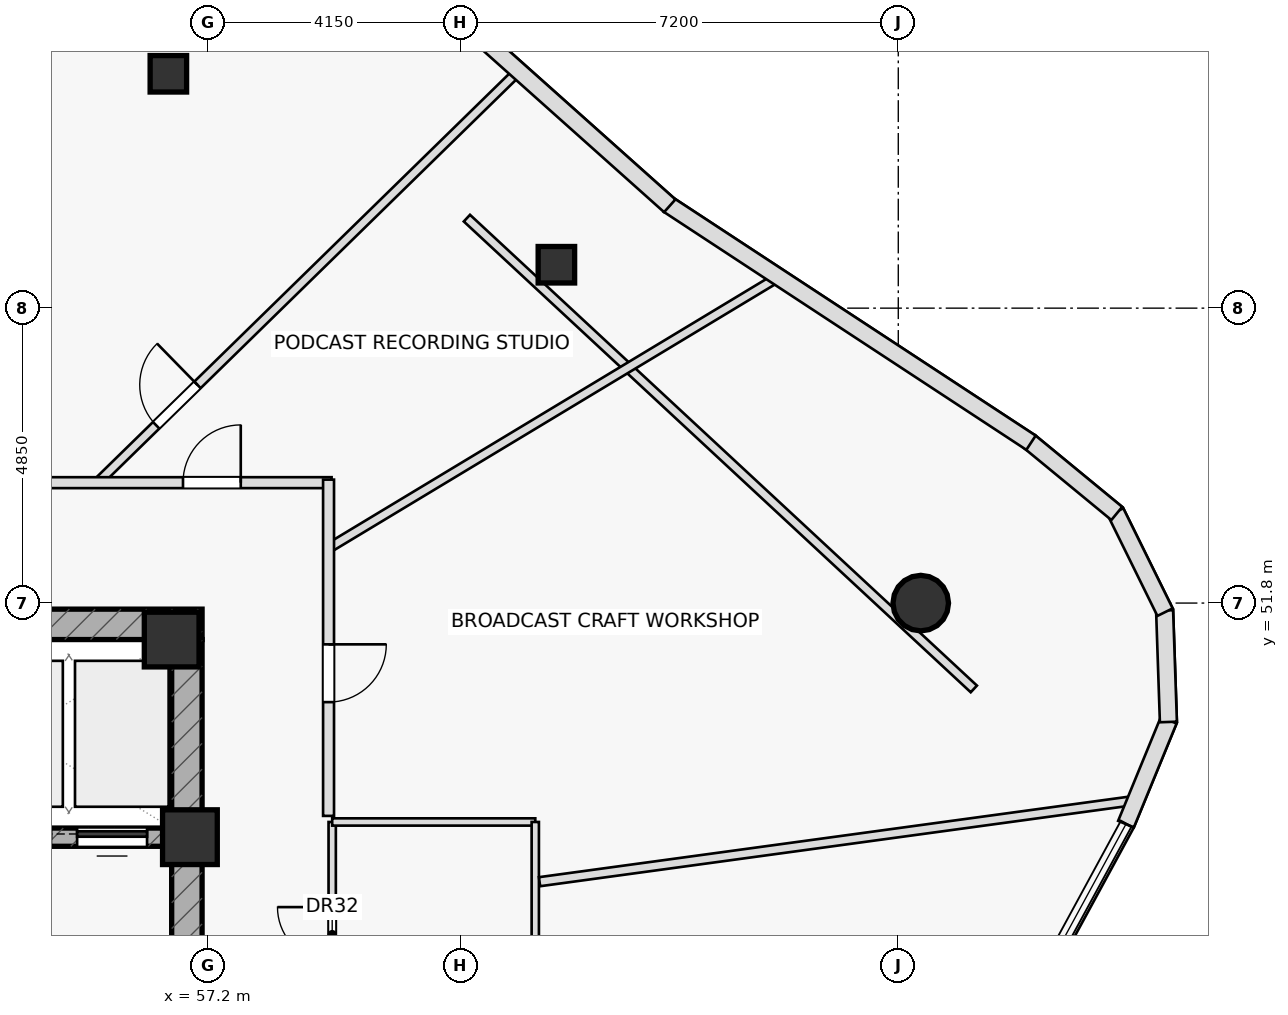
"""IFC4 building model, lengths in metres.
Left out: names, types, materials, properties, quantities, classifications, styles, units other than length and angle.
Written with IfcOpenShell. Run it as: python <this file> out.ifc"""

import sys

from ifc_helpers import new_model, si_unit, direction, frame, frame_2d, origin, origin_2d, place, context, subcontext, project, spatial, rectangle, hollow_rectangle, hollow_circle, extrude, element, fill, save


model = new_model("IFC4")
c1 = context("Model", 3, precision=1e-05, world=origin(), true_north=direction((0.0, 1.0)))
c2 = subcontext(c1, "Body", "Model", "MODEL_VIEW")
j1 = project(units=[si_unit("LENGTHUNIT", "METRE"), si_unit("PLANEANGLEUNIT", "RADIAN")], contexts=[c1])
p1 = place(None, origin())
s1 = spatial("IfcSite", under=j1, at=p1, CompositionType="ELEMENT")
p2 = place(p1, origin())
s2 = spatial("IfcBuilding", under=s1, at=p2, CompositionType="ELEMENT")
p3 = place(p2, frame((0.0, 0.0, 226.1)))
s3 = spatial("IfcBuildingStorey", under=s2, at=p3, CompositionType="ELEMENT", Elevation=226.1)
p4 = place(p3, frame((42.9, 51.45, 0.0), z_axis=(0.0, 0.0, 1.0), x_axis=(1.0, 0.0, 0.0)))
e1 = element("IfcWall", 1, at=p4, inside=s3, PredefinedType="SHEAR", context=c2, shape_type="SweptSolid", body=[
    extrude(rectangle(XDim=14.2, YDim=0.5, at=frame_2d((7.1, 0.0))), origin(), (0.0, 0.0, 1.0), 3.65),
])
p5 = place(p4, frame((0.78, 0.0, 0.0)))
e2 = element("IfcOpeningElement", 2, at=p5, cuts=e1, PredefinedType="OPENING", context=c2, shape_type="SweptSolid", body=[
    extrude(rectangle(XDim=1.05, YDim=2.2, at=frame_2d((0.525, 1.1))), frame((0.0, 0.26, 0.0), z_axis=(0.0, -1.0, 0.0), x_axis=(1.0, 0.0, 0.0)), (0.0, 0.0, 1.0), 0.52),
])
p6 = place(p3, frame((56.85, 38.8, 0.0), z_axis=(0.0, 0.0, 1.0), x_axis=(0.0, 1.0, 0.0)))
e3 = element("IfcWall", 3, at=p6, inside=s3, PredefinedType="SHEAR", context=c2, shape_type="SweptSolid", body=[
    extrude(rectangle(XDim=12.4, YDim=0.5, at=frame_2d((6.2, 0.0))), origin(), (0.0, 0.0, 1.0), 3.65),
])
p7 = place(p6, frame((3.85, 0.0, 0.0)))
e4 = element("IfcOpeningElement", 4, at=p7, cuts=e3, PredefinedType="OPENING", context=c2, shape_type="SweptSolid", body=[
    extrude(rectangle(XDim=1.5, YDim=2.2, at=frame_2d((0.75, 1.1))), frame((0.0, 0.26, 0.0), z_axis=(0.0, -1.0, 0.0), x_axis=(1.0, 0.0, 0.0)), (0.0, 0.0, 1.0), 0.52),
])
p8 = place(p3, frame((43.4, 47.95, 0.0), z_axis=(0.0, 0.0, 1.0), x_axis=(1.0, 0.0, 0.0)))
e5 = element("IfcWall", 5, at=p8, inside=s3, PredefinedType="SHEAR", context=c2, shape_type="SweptSolid", body=[
    extrude(rectangle(XDim=13.2, YDim=0.3, at=frame_2d((6.6, 0.0))), origin(), (0.0, 0.0, 1.0), 3.65),
])
p9 = place(p8, frame((8.345, 0.0, 0.0)))
e6 = element("IfcOpeningElement", 6, at=p9, cuts=e5, PredefinedType="OPENING", context=c2, shape_type="SweptSolid", body=[
    extrude(rectangle(XDim=1.15, YDim=2.2, at=frame_2d((0.575, 1.1))), frame((0.0, 0.16, 0.0), z_axis=(0.0, -1.0, 0.0), x_axis=(1.0, 0.0, 0.0)), (0.0, 0.0, 1.0), 0.32),
])
p10 = place(p8, frame((10.065, 0.0, 0.0)))
e7 = element("IfcOpeningElement", 7, at=p10, cuts=e5, PredefinedType="OPENING", context=c2, shape_type="SweptSolid", body=[
    extrude(rectangle(XDim=1.15, YDim=2.2, at=frame_2d((0.575, 1.1))), frame((0.0, 0.16, 0.0), z_axis=(0.0, -1.0, 0.0), x_axis=(1.0, 0.0, 0.0)), (0.0, 0.0, 1.0), 0.32),
])
p11 = place(p8, frame((11.645, 0.0, 0.0)))
e8 = element("IfcOpeningElement", 8, at=p11, cuts=e5, PredefinedType="OPENING", context=c2, shape_type="SweptSolid", body=[
    extrude(rectangle(XDim=1.15, YDim=2.2, at=frame_2d((0.575, 1.1))), frame((0.0, 0.16, 0.0), z_axis=(0.0, -1.0, 0.0), x_axis=(1.0, 0.0, 0.0)), (0.0, 0.0, 1.0), 0.32),
])
for number, where, z_axis, x_axis in (
    (9, (56.9, 47.95, 0.0), (0.0, 0.0, 1.0), (1.0, 0.0, 0.0)),
    (10, (56.6, 51.2, 0.0), (0.0, 0.0, 1.0), (1.0, 0.0, 0.0)),
):
    element("IfcColumn", number, at=place(p3, frame(where, z_axis=z_axis, x_axis=x_axis)), inside=s3, PredefinedType="COLUMN", context=c2, shape_type="SweptSolid", body=[
        extrude(rectangle(XDim=0.9, YDim=0.9, at=origin_2d()), origin(), (0.0, 0.0, 1.0), 3.65),
    ])
p12 = place(p3, frame((68.92, 51.799, 0.0), z_axis=(0.0, 0.0, 1.0), x_axis=(1.0, 0.0, 0.0)))
e11 = element("IfcColumn", 11, at=p12, inside=s3, PredefinedType="COLUMN", context=c2, shape_type="SweptSolid", body=[
    extrude(hollow_circle(Radius=0.457, WallThickness=0.04, at=origin_2d()), origin(), (0.0, 0.0, 1.0), 3.65),
])
for number, where, z_axis, x_axis in (
    (12, (62.927, 57.364, 0.0), (0.0, 0.0, 1.0), (1.0, 0.0, 0.0)),
    (13, (56.546, 60.504, 0.0), (0.0, 0.0, 1.0), (1.0, 0.0, 0.0)),
):
    element("IfcColumn", number, at=place(p3, frame(where, z_axis=z_axis, x_axis=x_axis)), inside=s3, PredefinedType="COLUMN", context=c2, shape_type="SweptSolid", body=[
        extrude(hollow_rectangle(XDim=0.6, YDim=0.6, WallThickness=0.036, at=origin_2d()), origin(), (0.0, 0.0, 1.0), 3.65),
    ])
p13 = place(p3, frame((69.792, 50.388, 0.0), z_axis=(0.0, 0.0, 1.0), x_axis=(-0.732769799181, 0.680476613418, 0.0)))
e14 = element("IfcWall", 14, at=p13, inside=s3, PredefinedType="PARTITIONING", context=c2, shape_type="SweptSolid", body=[
    extrude(rectangle(XDim=11.378, YDim=0.15, at=frame_2d((5.689, 0.0))), origin(), (0.0, 0.0, 1.0), 3.025),
])
p14 = place(p3, frame((59.24, 41.2, 0.0), z_axis=(0.0, 0.0, 1.0), x_axis=(0.0, 1.0, 0.0)))
e15 = element("IfcWall", 15, at=p14, inside=s3, PredefinedType="PARTITIONING", context=c2, shape_type="SweptSolid", body=[
    extrude(rectangle(XDim=7.0, YDim=0.12, at=frame_2d((3.5, 0.0))), origin(), (0.0, 0.0, 1.0), 3.65),
])
p15 = place(p14, frame((1.15, 0.0, 0.0)))
e16 = element("IfcOpeningElement", 16, at=p15, cuts=e15, PredefinedType="OPENING", context=c2, shape_type="SweptSolid", body=[
    extrude(rectangle(XDim=0.9, YDim=2.05, at=frame_2d((0.45, 1.025))), frame((0.0, 0.07, 0.0), z_axis=(0.0, -1.0, 0.0), x_axis=(1.0, 0.0, 0.0)), (0.0, 0.0, 1.0), 0.14),
])
p16 = place(p14, frame((4.7, 0.0, 0.0)))
e17 = element("IfcOpeningElement", 17, at=p16, cuts=e15, PredefinedType="OPENING", context=c2, shape_type="SweptSolid", body=[
    extrude(rectangle(XDim=0.9, YDim=2.05, at=frame_2d((0.45, 1.025))), frame((0.0, 0.07, 0.0), z_axis=(0.0, -1.0, 0.0), x_axis=(1.0, 0.0, 0.0)), (0.0, 0.0, 1.0), 0.14),
])
p17 = place(p3, frame((59.24, 48.2, 0.0), z_axis=(0.0, 0.0, 1.0), x_axis=(1.0, 0.0, 0.0)))
e18 = element("IfcWall", 18, at=p17, inside=s3, PredefinedType="PARTITIONING", context=c2, shape_type="SweptSolid", body=[
    extrude(rectangle(XDim=3.34, YDim=0.12, at=frame_2d((1.67, 0.0))), origin(), (0.0, 0.0, 1.0), 3.65),
])
p18 = place(p3, frame((62.58, 41.2, 0.0), z_axis=(0.0, 0.0, 1.0), x_axis=(0.0, 1.0, 0.0)))
e19 = element("IfcWall", 19, at=p18, inside=s3, PredefinedType="PARTITIONING", context=c2, shape_type="SweptSolid", body=[
    extrude(rectangle(XDim=7.0, YDim=0.12, at=frame_2d((3.5, 0.0))), origin(), (0.0, 0.0, 1.0), 3.325),
])
p19 = place(p3, frame((62.65, 47.218, 0.0), z_axis=(0.0, 0.0, 1.0), x_axis=(0.990815618687, 0.135219857145, 0.0)))
e20 = element("IfcWall", 20, at=p19, inside=s3, PredefinedType="PARTITIONING", context=c2, shape_type="SweptSolid", body=[
    extrude(rectangle(XDim=9.909, YDim=0.15, at=frame_2d((4.954, 0.0))), origin(), (0.0, 0.0, 1.0), 3.135),
])
p20 = place(p3, frame((59.18, 52.703, 0.0), z_axis=(0.0, 0.0, 1.0), x_axis=(0.856467782729, 0.516200481544, 0.0)))
e21 = element("IfcWall", 21, at=p20, inside=s3, PredefinedType="PARTITIONING", context=c2, shape_type="SweptSolid", body=[
    extrude(rectangle(XDim=8.651, YDim=0.15, at=frame_2d((4.325, 0.0))), origin(), (0.0, 0.0, 1.0), 3.135),
])
p21 = place(p3, frame((55.38, 53.78, 0.0), z_axis=(0.0, 0.0, 1.0), x_axis=(0.715018135808, 0.699105904327, 0.0)))
e22 = element("IfcWall", 22, at=p21, inside=s3, PredefinedType="PARTITIONING", context=c2, shape_type="SweptSolid", body=[
    extrude(rectangle(XDim=9.697, YDim=0.15, at=frame_2d((4.848, 0.0))), origin(), (0.0, 0.0, 1.0), 3.025),
])
p22 = place(p21, frame((1.35, 0.0, 0.0)))
e23 = element("IfcOpeningElement", 23, at=p22, cuts=e22, PredefinedType="OPENING", context=c2, shape_type="SweptSolid", body=[
    extrude(rectangle(XDim=0.95, YDim=2.05, at=frame_2d((0.475, 1.025))), frame((0.0, 0.085, 0.0), z_axis=(0.0, -1.0, 0.0), x_axis=(1.0, 0.0, 0.0)), (0.0, 0.0, 1.0), 0.17),
])
p23 = place(p3, frame((54.3, 53.78, 0.0), z_axis=(0.0, 0.0, 1.0), x_axis=(1.0, 0.0, 0.0)))
e24 = element("IfcWall", 24, at=p23, inside=s3, PredefinedType="PARTITIONING", context=c2, shape_type="SweptSolid", body=[
    extrude(rectangle(XDim=4.93, YDim=0.18, at=frame_2d((2.465, 0.0))), origin(), (0.0, 0.0, 1.0), 3.65),
])
p24 = place(p23, frame((2.486, 0.0, 0.0)))
e25 = element("IfcOpeningElement", 25, at=p24, cuts=e24, PredefinedType="OPENING", context=c2, shape_type="SweptSolid", body=[
    extrude(rectangle(XDim=0.95, YDim=2.05, at=frame_2d((0.475, 1.025))), frame((0.0, 0.1, 0.0), z_axis=(0.0, -1.0, 0.0), x_axis=(1.0, 0.0, 0.0)), (0.0, 0.0, 1.0), 0.2),
])
p25 = place(p3, frame((59.18, 53.83, 0.0), z_axis=(0.0, 0.0, 1.0), x_axis=(0.0, -1.0, 0.0)))
e26 = element("IfcWall", 26, at=p25, inside=s3, PredefinedType="PARTITIONING", context=c2, shape_type="SweptSolid", body=[
    extrude(rectangle(XDim=5.53, YDim=0.18, at=frame_2d((2.765, 0.0))), origin(), (0.0, 0.0, 1.0), 3.65),
])
p26 = place(p25, frame((2.709, 0.0, 0.0)))
e27 = element("IfcOpeningElement", 27, at=p26, cuts=e26, PredefinedType="OPENING", context=c2, shape_type="SweptSolid", body=[
    extrude(rectangle(XDim=0.95, YDim=2.05, at=frame_2d((0.475, 1.025))), frame((0.0, 0.1, 0.0), z_axis=(0.0, -1.0, 0.0), x_axis=(1.0, 0.0, 0.0)), (0.0, 0.0, 1.0), 0.2),
])
p27 = place(p3, frame((72.295, 48.165, 0.0), z_axis=(0.0, 0.0, 1.0), x_axis=(0.380284386487, 0.924869604536, 0.0)))
e28 = element("IfcWall", 28, at=p27, inside=s3, PredefinedType="STANDARD", context=c2, shape_type="SweptSolid", body=[
    extrude(rectangle(XDim=1.847, YDim=0.28, at=frame_2d((0.923, 0.0))), origin(), (0.0, 0.0, 1.0), 3.65),
])
for number, where, z_axis, x_axis in (
    (29, (72.992, 49.844, 0.0), (0.0, 0.0, 1.0), (-0.034, 0.999, 0.0)),
    (30, (72.937, 51.651, 0.0), (0.0, 0.0, 1.0), (-0.442, 0.897, 0.0)),
):
    element("IfcWall", number, at=place(p3, frame(where, z_axis=z_axis, x_axis=x_axis)), inside=s3, PredefinedType="STANDARD", context=c2, shape_type="SweptSolid", body=[
        extrude(rectangle(XDim=1.835, YDim=0.28, at=frame_2d((0.918, 0.0))), origin(), (0.0, 0.0, 1.0), 3.65),
    ])
p28 = place(p3, frame((72.144, 53.274, 0.0), z_axis=(0.0, 0.0, 1.0), x_axis=(-0.772116029825, 0.635481578401, 0.0)))
e31 = element("IfcWall", 31, at=p28, inside=s3, PredefinedType="STANDARD", context=c2, shape_type="SweptSolid", body=[
    extrude(rectangle(XDim=1.858, YDim=0.28, at=frame_2d((0.929, 0.0))), origin(), (0.0, 0.0, 1.0), 3.65),
])
p29 = place(p3, frame((70.733, 54.437, 0.0), z_axis=(0.0, 0.0, 1.0), x_axis=(-0.836040062558, 0.548668400583, 0.0)))
e32 = element("IfcWall", 32, at=p29, inside=s3, PredefinedType="STANDARD", context=c2, shape_type="SweptSolid", body=[
    extrude(rectangle(XDim=7.135, YDim=0.28, at=frame_2d((3.567, 0.0))), origin(), (0.0, 0.0, 1.0), 3.65),
])
p30 = place(p3, frame((64.792, 58.333, 0.0), z_axis=(0.0, 0.0, 1.0), x_axis=(-0.745976161207, 0.665972647269, 0.0)))
e33 = element("IfcWall", 33, at=p30, inside=s3, PredefinedType="STANDARD", context=c2, shape_type="SweptSolid", body=[
    extrude(rectangle(XDim=7.763, YDim=0.28, at=frame_2d((3.882, 0.0))), origin(), (0.0, 0.0, 1.0), 3.65),
])
p31 = place(p16, origin())
e34 = element("IfcDoor", 34, at=p31, inside=s3, OperationType="SINGLE_SWING_RIGHT", PredefinedType="DOOR", context=c2, shape_type="SweptSolid", body=[
    extrude(rectangle(XDim=0.9, YDim=2.05, at=frame_2d((0.45, 1.025))), frame((0.0, 0.025, 0.0), z_axis=(0.0, -1.0, 0.0), x_axis=(1.0, 0.0, 0.0)), (0.0, 0.0, 1.0), 0.05),
])
fill(e17, e34)
p32 = place(p22, origin())
e35 = element("IfcDoor", 35, at=p32, inside=s3, OperationType="SINGLE_SWING_RIGHT", PredefinedType="DOOR", context=c2, shape_type="SweptSolid", body=[
    extrude(rectangle(XDim=0.95, YDim=2.05, at=frame_2d((0.475, 1.025))), frame((0.0, 0.025, 0.0), z_axis=(0.0, -1.0, 0.0), x_axis=(1.0, 0.0, 0.0)), (0.0, 0.0, 1.0), 0.05),
])
fill(e23, e35)
p33 = place(p24, origin())
e36 = element("IfcDoor", 36, at=p33, inside=s3, OperationType="SINGLE_SWING_RIGHT", PredefinedType="DOOR", context=c2, shape_type="SweptSolid", body=[
    extrude(rectangle(XDim=0.95, YDim=2.05, at=frame_2d((0.475, 1.025))), frame((0.0, 0.025, 0.0), z_axis=(0.0, -1.0, 0.0), x_axis=(1.0, 0.0, 0.0)), (0.0, 0.0, 1.0), 0.05),
])
fill(e25, e36)
p34 = place(p26, origin())
e37 = element("IfcDoor", 37, at=p34, inside=s3, OperationType="SINGLE_SWING_LEFT", PredefinedType="DOOR", context=c2, shape_type="SweptSolid", body=[
    extrude(rectangle(XDim=0.95, YDim=2.05, at=frame_2d((0.475, 1.025))), frame((0.0, 0.025, 0.0), z_axis=(0.0, -1.0, 0.0), x_axis=(1.0, 0.0, 0.0)), (0.0, 0.0, 1.0), 0.05),
])
fill(e27, e37)
p35 = place(p11, origin())
e38 = element("IfcDoor", 38, at=p35, inside=s3, OperationType="SLIDING_TO_LEFT", PredefinedType="DOOR", context=c2, shape_type="SweptSolid", body=[
    extrude(rectangle(XDim=1.15, YDim=2.2, at=frame_2d((0.575, 1.1))), frame((0.0, 0.025, 0.0), z_axis=(0.0, -1.0, 0.0), x_axis=(1.0, 0.0, 0.0)), (0.0, 0.0, 1.0), 0.05),
])
fill(e8, e38)
save(model, sys.argv[1])
